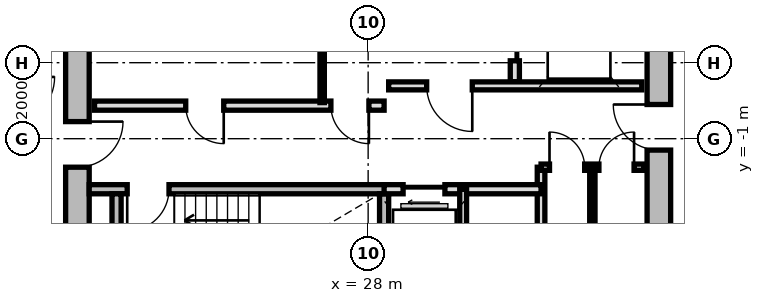
"""IFC4 building model, lengths in metres.
Left out: names, types, materials, properties, quantities, classifications, styles, units other than length and angle.
Written with IfcOpenShell. Run it as: python <this file> out.ifc"""

import sys

from ifc_helpers import new_model, si_unit, direction, frame, frame_2d, origin, place, context, subcontext, project, spatial, rectangle, extrude, source, transform, mapped, element, fill, save


model = new_model("IFC4")
c1 = context("Model", 3, precision=1e-05, world=origin(), true_north=direction((0.0, 1.0)))
c2 = subcontext(c1, "Body", "Model", "MODEL_VIEW")
j1 = project(units=[si_unit("LENGTHUNIT", "METRE"), si_unit("PLANEANGLEUNIT", "RADIAN")], contexts=[c1])
p1 = place(None, origin())
s1 = spatial("IfcSite", under=j1, at=p1, CompositionType="ELEMENT")
p2 = place(p1, origin())
s2 = spatial("IfcBuilding", under=s1, at=p2, CompositionType="ELEMENT")
p3 = place(p2, frame((0.0, 0.0, 146.5)))
s3 = spatial("IfcBuildingStorey", under=s2, at=p3, CompositionType="ELEMENT", Elevation=146.5)
m1 = source(origin(), c2, "Body", "SweptSolid", [
    extrude(rectangle(XDim=11.1, YDim=0.62, at=frame_2d((5.55, 0.0))), origin(), (0.0, 0.0, 1.0), 2.81),
])
p4 = place(p3, frame((20.35, -5.55, 0.0), z_axis=(0.0, 0.0, 1.0), x_axis=(0.0, 1.0, 0.0)))
e1 = element("IfcWall", 1, at=p4, inside=s3, PredefinedType="SHEAR", context=c2, shape_type="MappedRepresentation", body=[
    mapped(m1, transform((0.0, 0.0, 0.0), x_axis=(1.0, 0.0, 0.0), y_axis=(0.0, 1.0, 0.0), z_axis=(0.0, 0.0, 1.0), scale=1.0)),
])
p5 = place(p4, frame((3.8, 0.0, 0.0)))
e2 = element("IfcOpeningElement", 2, at=p5, cuts=e1, PredefinedType="OPENING", context=c2, shape_type="SweptSolid", body=[
    extrude(rectangle(XDim=1.2, YDim=2.15, at=frame_2d((0.6, 1.075))), frame((0.0, 0.32, 0.0), z_axis=(0.0, -1.0, 0.0), x_axis=(1.0, 0.0, 0.0)), (0.0, 0.0, 1.0), 0.64),
])
p6 = place(p3, frame((35.65, 5.55, 0.0), z_axis=(0.0, 0.0, 1.0), x_axis=(0.0, -1.0, 0.0)))
e3 = element("IfcWall", 3, at=p6, inside=s3, PredefinedType="SHEAR", context=c2, shape_type="MappedRepresentation", body=[
    mapped(m1, transform((0.0, 0.0, 0.0), x_axis=(1.0, 0.0, 0.0), y_axis=(0.0, 1.0, 0.0), z_axis=(0.0, 0.0, 1.0), scale=1.0)),
])
p7 = place(p6, frame((5.65, 0.0, 0.0)))
e4 = element("IfcOpeningElement", 4, at=p7, cuts=e3, PredefinedType="OPENING", context=c2, shape_type="SweptSolid", body=[
    extrude(rectangle(XDim=1.2, YDim=2.15, at=frame_2d((0.6, 1.075))), frame((0.0, 0.32, 0.0), z_axis=(0.0, -1.0, 0.0), x_axis=(1.0, 0.0, 0.0)), (0.0, 0.0, 1.0), 0.64),
])
m2 = source(origin(), c2, "Body", "SweptSolid", [
    extrude(rectangle(XDim=7.88, YDim=0.24, at=frame_2d((3.94, 0.0))), origin(), (0.0, 0.0, 1.0), 2.81),
])
p8 = place(p3, frame((20.66, -2.33, 0.0), z_axis=(0.0, 0.0, 1.0), x_axis=(1.0, 0.0, 0.0)))
e5 = element("IfcWall", 5, at=p8, inside=s3, PredefinedType="PARTITIONING", context=c2, shape_type="MappedRepresentation", body=[
    mapped(m2, transform((0.0, 0.0, 0.0), x_axis=(1.0, 0.0, 0.0), y_axis=(0.0, 1.0, 0.0), z_axis=(0.0, 0.0, 1.0), scale=1.0)),
])
p9 = place(p8, frame((1.0, 0.0, 0.0)))
e6 = element("IfcOpeningElement", 6, at=p9, cuts=e5, PredefinedType="OPENING", context=c2, shape_type="SweptSolid", body=[
    extrude(rectangle(XDim=1.1, YDim=2.15, at=frame_2d((0.55, 1.075))), frame((0.0, 0.13, 0.0), z_axis=(0.0, -1.0, 0.0), x_axis=(1.0, 0.0, 0.0)), (0.0, 0.0, 1.0), 0.26),
])
m3 = source(origin(), c2, "Body", "SweptSolid", [
    extrude(rectangle(XDim=3.19, YDim=0.24, at=frame_2d((1.595, 0.0))), origin(), (0.0, 0.0, 1.0), 2.81),
])
for number, where, z_axis, x_axis in (
    (7, (21.38, -5.64, 0.0), (0.0, 0.0, 1.0), (0.0, 1.0, 0.0)),
    (8, (28.42, -5.64, 0.0), (0.0, 0.0, 1.0), (0.0, 1.0, 0.0)),
):
    element("IfcWall", number, at=place(p3, frame(where, z_axis=z_axis, x_axis=x_axis)), inside=s3, PredefinedType="PARTITIONING", context=c2, shape_type="MappedRepresentation", body=[
        mapped(m3, transform((0.0, 0.0, 0.0), x_axis=(1.0, 0.0, 0.0), y_axis=(0.0, 1.0, 0.0), z_axis=(0.0, 0.0, 1.0), scale=1.0)),
    ])
m4 = source(origin(), c2, "Body", "SweptSolid", [
    extrude(rectangle(XDim=5.0, YDim=0.24, at=frame_2d((2.5, 0.0))), origin(), (0.0, 0.0, 1.0), 2.795),
])
p10 = place(p3, frame((31.86, 0.5, 0.0), z_axis=(0.0, 0.0, 1.0), x_axis=(0.0, 1.0, 0.0)))
e9 = element("IfcWall", 9, at=p10, inside=s3, PredefinedType="PARTITIONING", context=c2, shape_type="MappedRepresentation", body=[
    mapped(m4, transform((0.0, 0.0, 0.0), x_axis=(1.0, 0.0, 0.0), y_axis=(0.0, 1.0, 0.0), z_axis=(0.0, 0.0, 1.0), scale=1.0)),
])
p11 = place(p10, frame((3.05, 0.0, 0.0)))
e10 = element("IfcOpeningElement", 10, at=p11, cuts=e9, PredefinedType="OPENING", context=c2, shape_type="SweptSolid", body=[
    extrude(rectangle(XDim=1.3, YDim=2.2, at=frame_2d((0.65, 1.1))), frame((0.0, 0.13, 0.0), z_axis=(0.0, -1.0, 0.0), x_axis=(1.0, 0.0, 0.0)), (0.0, 0.0, 1.0), 0.26),
])
p12 = place(p10, frame((0.55, 0.0, 0.0)))
e11 = element("IfcOpeningElement", 11, at=p12, cuts=e9, PredefinedType="OPENING", context=c2, shape_type="SweptSolid", body=[
    extrude(rectangle(XDim=1.3, YDim=2.2, at=frame_2d((0.65, 1.1))), frame((0.0, 0.13, 0.0), z_axis=(0.0, -1.0, 0.0), x_axis=(1.0, 0.0, 0.0)), (0.0, 0.0, 1.0), 0.26),
])
m5 = source(origin(), c2, "Body", "SweptSolid", [
    extrude(rectangle(XDim=6.66, YDim=0.21, at=frame_2d((3.33, 0.0))), origin(), (0.0, 0.0, 1.0), 2.795),
])
p13 = place(p3, frame((28.54, 0.39, 0.0), z_axis=(0.0, 0.0, 1.0), x_axis=(1.0, 0.0, 0.0)))
e12 = element("IfcWall", 12, at=p13, inside=s3, PredefinedType="PARTITIONING", context=c2, shape_type="MappedRepresentation", body=[
    mapped(m5, transform((0.0, 0.0, 0.0), x_axis=(1.0, 0.0, 0.0), y_axis=(0.0, 1.0, 0.0), z_axis=(0.0, 0.0, 1.0), scale=1.0)),
])
p14 = place(p13, frame((1.0, 0.0, 0.0)))
e13 = element("IfcOpeningElement", 13, at=p14, cuts=e12, PredefinedType="OPENING", context=c2, shape_type="SweptSolid", body=[
    extrude(rectangle(XDim=1.2, YDim=2.15, at=frame_2d((0.6, 1.075))), frame((0.0, 0.115, 0.0), z_axis=(0.0, -1.0, 0.0), x_axis=(1.0, 0.0, 0.0)), (0.0, 0.0, 1.0), 0.23),
])
m6 = source(origin(), c2, "Body", "SweptSolid", [
    extrude(rectangle(XDim=7.62, YDim=0.24, at=frame_2d((3.81, 0.0))), origin(), (0.0, 0.0, 1.0), 2.795),
])
p15 = place(p3, frame((20.8, -0.13, 0.0), z_axis=(0.0, 0.0, 1.0), x_axis=(1.0, 0.0, 0.0)))
e14 = element("IfcWall", 14, at=p15, inside=s3, PredefinedType="PARTITIONING", context=c2, shape_type="MappedRepresentation", body=[
    mapped(m6, transform((0.0, 0.0, 0.0), x_axis=(1.0, 0.0, 0.0), y_axis=(0.0, 1.0, 0.0), z_axis=(0.0, 0.0, 1.0), scale=1.0)),
])
p16 = place(p15, frame((6.22, 0.0, 0.0)))
e15 = element("IfcOpeningElement", 15, at=p16, cuts=e14, PredefinedType="OPENING", context=c2, shape_type="SweptSolid", body=[
    extrude(rectangle(XDim=1.0, YDim=2.1, at=frame_2d((0.5, 1.05))), frame((0.0, 0.13, 0.0), z_axis=(0.0, -1.0, 0.0), x_axis=(1.0, 0.0, 0.0)), (0.0, 0.0, 1.0), 0.26),
])
p17 = place(p15, frame((2.4, 0.0, 0.0)))
e16 = element("IfcOpeningElement", 16, at=p17, cuts=e14, PredefinedType="OPENING", context=c2, shape_type="SweptSolid", body=[
    extrude(rectangle(XDim=1.0, YDim=2.1, at=frame_2d((0.5, 1.05))), frame((0.0, 0.13, 0.0), z_axis=(0.0, -1.0, 0.0), x_axis=(1.0, 0.0, 0.0)), (0.0, 0.0, 1.0), 0.26),
])
m7 = source(origin(), c2, "Body", "SweptSolid", [
    extrude(rectangle(XDim=2.33, YDim=0.115, at=frame_2d((1.165, 0.0))), origin(), (0.0, 0.0, 1.0), 2.795),
])
p18 = place(p3, frame((26.79, -0.05, 0.0), z_axis=(0.0, 0.0, 1.0), x_axis=(0.0, 1.0, 0.0)))
e17 = element("IfcWall", 17, at=p18, inside=s3, PredefinedType="PARTITIONING", context=c2, shape_type="MappedRepresentation", body=[
    mapped(m7, transform((0.0, 0.0, 0.0), x_axis=(1.0, 0.0, 0.0), y_axis=(0.0, 1.0, 0.0), z_axis=(0.0, 0.0, 1.0), scale=1.0)),
])
m8 = source(origin(), c2, "Body", "SweptSolid", [
    extrude(rectangle(XDim=3.8, YDim=0.2, at=frame_2d((1.9, 0.0))), origin(), (0.0, 0.0, 1.0), 2.795),
])
p19 = place(p3, frame((32.55, -5.55, 0.0), z_axis=(0.0, 0.0, 1.0), x_axis=(0.0, 1.0, 0.0)))
e18 = element("IfcWall", 18, at=p19, inside=s3, PredefinedType="PARTITIONING", context=c2, shape_type="MappedRepresentation", body=[
    mapped(m8, transform((0.0, 0.0, 0.0), x_axis=(1.0, 0.0, 0.0), y_axis=(0.0, 1.0, 0.0), z_axis=(0.0, 0.0, 1.0), scale=1.0)),
])
m9 = source(origin(), c2, "Body", "SweptSolid", [
    extrude(rectangle(XDim=4.13, YDim=0.24, at=frame_2d((2.065, 0.0))), origin(), (0.0, 0.0, 1.0), 2.795),
])
p20 = place(p3, frame((28.42, -2.33, 0.0), z_axis=(0.0, 0.0, 1.0), x_axis=(1.0, 0.0, 0.0)))
e19 = element("IfcWall", 19, at=p20, inside=s3, PredefinedType="PARTITIONING", context=c2, shape_type="MappedRepresentation", body=[
    mapped(m9, transform((0.0, 0.0, 0.0), x_axis=(1.0, 0.0, 0.0), y_axis=(0.0, 1.0, 0.0), z_axis=(0.0, 0.0, 1.0), scale=1.0)),
])
p21 = place(p20, frame((0.5, 0.0, 0.0)))
e20 = element("IfcOpeningElement", 20, at=p21, cuts=e19, PredefinedType="OPENING", context=c2, shape_type="SweptSolid", body=[
    extrude(rectangle(XDim=1.1, YDim=2.2, at=frame_2d((0.55, 1.1))), frame((0.0, 0.13, 0.0), z_axis=(0.0, -1.0, 0.0), x_axis=(1.0, 0.0, 0.0)), (0.0, 0.0, 1.0), 0.26),
])
m10 = source(origin(), c2, "Body", "SweptSolid", [
    extrude(rectangle(XDim=3.22, YDim=0.18, at=frame_2d((1.61, 0.0))), origin(), (0.0, 0.0, 1.0), 2.795),
])
p22 = place(p3, frame((30.5, -5.55, 0.0), z_axis=(0.0, 0.0, 1.0), x_axis=(0.0, 1.0, 0.0)))
e21 = element("IfcWall", 21, at=p22, inside=s3, PredefinedType="PARTITIONING", context=c2, shape_type="MappedRepresentation", body=[
    mapped(m10, transform((0.0, 0.0, 0.0), x_axis=(1.0, 0.0, 0.0), y_axis=(0.0, 1.0, 0.0), z_axis=(0.0, 0.0, 1.0), scale=1.0)),
])
m11 = source(origin(), c2, "Body", "SweptSolid", [
    extrude(rectangle(XDim=2.7, YDim=0.165, at=frame_2d((1.35, 0.0))), origin(), (0.0, 0.0, 1.0), 2.795),
])
p23 = place(p3, frame((32.55, -1.75, 0.0), z_axis=(0.0, 0.0, 1.0), x_axis=(1.0, 0.0, 0.0)))
e22 = element("IfcWall", 22, at=p23, inside=s3, PredefinedType="PARTITIONING", context=c2, shape_type="MappedRepresentation", body=[
    mapped(m11, transform((0.0, 0.0, 0.0), x_axis=(1.0, 0.0, 0.0), y_axis=(0.0, 1.0, 0.0), z_axis=(0.0, 0.0, 1.0), scale=1.0)),
])
p24 = place(p23, frame((0.222, 0.0, 0.0)))
e23 = element("IfcOpeningElement", 23, at=p24, cuts=e22, PredefinedType="OPENING", context=c2, shape_type="SweptSolid", body=[
    extrude(rectangle(XDim=0.925, YDim=2.1, at=frame_2d((0.462, 1.05))), frame((0.0, 0.093, 0.0), z_axis=(0.0, -1.0, 0.0), x_axis=(1.0, 0.0, 0.0)), (0.0, 0.0, 1.0), 0.185),
])
p25 = place(p23, frame((1.522, 0.0, 0.0)))
e24 = element("IfcOpeningElement", 24, at=p25, cuts=e22, PredefinedType="OPENING", context=c2, shape_type="SweptSolid", body=[
    extrude(rectangle(XDim=0.925, YDim=2.1, at=frame_2d((0.462, 1.05))), frame((0.0, 0.093, 0.0), z_axis=(0.0, -1.0, 0.0), x_axis=(1.0, 0.0, 0.0)), (0.0, 0.0, 1.0), 0.185),
])
m12 = source(origin(), c2, "Body", "SweptSolid", [
    extrude(rectangle(XDim=3.8, YDim=0.14, at=frame_2d((1.9, 0.0))), origin(), (0.0, 0.0, 1.0), 2.795),
])
p26 = place(p3, frame((33.9, -5.55, 0.0), z_axis=(0.0, 0.0, 1.0), x_axis=(0.0, 1.0, 0.0)))
e25 = element("IfcWall", 25, at=p26, inside=s3, PredefinedType="PARTITIONING", context=c2, shape_type="MappedRepresentation", body=[
    mapped(m12, transform((0.0, 0.0, 0.0), x_axis=(1.0, 0.0, 0.0), y_axis=(0.0, 1.0, 0.0), z_axis=(0.0, 0.0, 1.0), scale=1.0)),
])
m13 = source(origin(), c2, "Body", "SweptSolid", [
    extrude(rectangle(XDim=1.1, YDim=2.15, at=frame_2d((0.55, 1.075))), frame((0.0, 0.025, 0.0), z_axis=(0.0, -1.0, 0.0), x_axis=(1.0, 0.0, 0.0)), (0.0, 0.0, 1.0), 0.05),
])
p27 = place(p9, frame((1.1, 0.0, 0.0), z_axis=(0.0, 0.0, 1.0), x_axis=(-1.0, 0.0, 0.0)))
e26 = element("IfcDoor", 26, at=p27, inside=s3, OperationType="SINGLE_SWING_RIGHT", PredefinedType="DOOR", context=c2, shape_type="MappedRepresentation", body=[
    mapped(m13, transform((0.0, 0.0, 0.0), x_axis=(1.0, 0.0, 0.0), y_axis=(0.0, 1.0, 0.0), z_axis=(0.0, 0.0, 1.0), scale=1.0)),
])
fill(e6, e26)
m14 = source(origin(), c2, "Body", "SweptSolid", [
    extrude(rectangle(XDim=1.3, YDim=2.2, at=frame_2d((0.65, 1.1))), frame((0.0, 0.025, 0.0), z_axis=(0.0, -1.0, 0.0), x_axis=(1.0, 0.0, 0.0)), (0.0, 0.0, 1.0), 0.05),
])
p28 = place(p12, origin())
e27 = element("IfcDoor", 27, at=p28, inside=s3, OperationType="SLIDING_TO_RIGHT", PredefinedType="DOOR", context=c2, shape_type="MappedRepresentation", body=[
    mapped(m14, transform((0.0, 0.0, 0.0), x_axis=(1.0, 0.0, 0.0), y_axis=(0.0, 1.0, 0.0), z_axis=(0.0, 0.0, 1.0), scale=1.0)),
])
fill(e11, e27)
m15 = source(origin(), c2, "Body", "SweptSolid", [
    extrude(rectangle(XDim=1.2, YDim=2.15, at=frame_2d((0.6, 1.075))), frame((0.0, 0.025, 0.0), z_axis=(0.0, -1.0, 0.0), x_axis=(1.0, 0.0, 0.0)), (0.0, 0.0, 1.0), 0.05),
])
p29 = place(p14, frame((1.2, 0.0, 0.0), z_axis=(0.0, 0.0, 1.0), x_axis=(-1.0, 0.0, 0.0)))
e28 = element("IfcDoor", 28, at=p29, inside=s3, OperationType="SINGLE_SWING_LEFT", PredefinedType="DOOR", context=c2, shape_type="MappedRepresentation", body=[
    mapped(m15, transform((0.0, 0.0, 0.0), x_axis=(1.0, 0.0, 0.0), y_axis=(0.0, 1.0, 0.0), z_axis=(0.0, 0.0, 1.0), scale=1.0)),
])
fill(e13, e28)
p30 = place(p5, frame((1.2, 0.0, 0.0), z_axis=(0.0, 0.0, 1.0), x_axis=(-1.0, 0.0, 0.0)))
e29 = element("IfcDoor", 29, at=p30, inside=s3, OperationType="SINGLE_SWING_LEFT", PredefinedType="DOOR", context=c2, shape_type="MappedRepresentation", body=[
    mapped(m15, transform((0.0, 0.0, 0.0), x_axis=(1.0, 0.0, 0.0), y_axis=(0.0, 1.0, 0.0), z_axis=(0.0, 0.0, 1.0), scale=1.0)),
])
fill(e2, e29)
p31 = place(p7, frame((1.2, 0.0, 0.0), z_axis=(0.0, 0.0, 1.0), x_axis=(-1.0, 0.0, 0.0)))
e30 = element("IfcDoor", 30, at=p31, inside=s3, OperationType="SINGLE_SWING_RIGHT", PredefinedType="DOOR", context=c2, shape_type="MappedRepresentation", body=[
    mapped(m15, transform((0.0, 0.0, 0.0), x_axis=(1.0, 0.0, 0.0), y_axis=(0.0, 1.0, 0.0), z_axis=(0.0, 0.0, 1.0), scale=1.0)),
])
fill(e4, e30)
m16 = source(origin(), c2, "Body", "SweptSolid", [
    extrude(rectangle(XDim=1.0, YDim=2.1, at=frame_2d((0.5, 1.05))), frame((0.0, 0.025, 0.0), z_axis=(0.0, -1.0, 0.0), x_axis=(1.0, 0.0, 0.0)), (0.0, 0.0, 1.0), 0.05),
])
p32 = place(p16, frame((1.0, 0.0, 0.0), z_axis=(0.0, 0.0, 1.0), x_axis=(-1.0, 0.0, 0.0)))
e31 = element("IfcDoor", 31, at=p32, inside=s3, OperationType="SINGLE_SWING_LEFT", PredefinedType="DOOR", context=c2, shape_type="MappedRepresentation", body=[
    mapped(m16, transform((0.0, 0.0, 0.0), x_axis=(1.0, 0.0, 0.0), y_axis=(0.0, 1.0, 0.0), z_axis=(0.0, 0.0, 1.0), scale=1.0)),
])
fill(e15, e31)
p33 = place(p17, frame((1.0, 0.0, 0.0), z_axis=(0.0, 0.0, 1.0), x_axis=(-1.0, 0.0, 0.0)))
e32 = element("IfcDoor", 32, at=p33, inside=s3, OperationType="SINGLE_SWING_LEFT", PredefinedType="DOOR", context=c2, shape_type="MappedRepresentation", body=[
    mapped(m16, transform((0.0, 0.0, 0.0), x_axis=(1.0, 0.0, 0.0), y_axis=(0.0, 1.0, 0.0), z_axis=(0.0, 0.0, 1.0), scale=1.0)),
])
fill(e16, e32)
m17 = source(origin(), c2, "Body", "SweptSolid", [
    extrude(rectangle(XDim=1.1, YDim=2.2, at=frame_2d((0.55, 1.1))), frame((0.0, 0.025, 0.0), z_axis=(0.0, -1.0, 0.0), x_axis=(1.0, 0.0, 0.0)), (0.0, 0.0, 1.0), 0.05),
])
p34 = place(p21, frame((1.1, 0.0, 0.0), z_axis=(0.0, 0.0, 1.0), x_axis=(-1.0, 0.0, 0.0)))
e33 = element("IfcDoor", 33, at=p34, inside=s3, OperationType="SLIDING_TO_LEFT", PredefinedType="DOOR", context=c2, shape_type="MappedRepresentation", body=[
    mapped(m17, transform((0.0, 0.0, 0.0), x_axis=(1.0, 0.0, 0.0), y_axis=(0.0, 1.0, 0.0), z_axis=(0.0, 0.0, 1.0), scale=1.0)),
])
fill(e20, e33)
m18 = source(origin(), c2, "Body", "SweptSolid", [
    extrude(rectangle(XDim=0.925, YDim=2.1, at=frame_2d((0.462, 1.05))), frame((0.0, 0.025, 0.0), z_axis=(0.0, -1.0, 0.0), x_axis=(1.0, 0.0, 0.0)), (0.0, 0.0, 1.0), 0.05),
])
p35 = place(p24, origin())
e34 = element("IfcDoor", 34, at=p35, inside=s3, OperationType="SINGLE_SWING_LEFT", PredefinedType="DOOR", context=c2, shape_type="MappedRepresentation", body=[
    mapped(m18, transform((0.0, 0.0, 0.0), x_axis=(1.0, 0.0, 0.0), y_axis=(0.0, 1.0, 0.0), z_axis=(0.0, 0.0, 1.0), scale=1.0)),
])
fill(e23, e34)
p36 = place(p25, origin())
e35 = element("IfcDoor", 35, at=p36, inside=s3, OperationType="SINGLE_SWING_RIGHT", PredefinedType="DOOR", context=c2, shape_type="MappedRepresentation", body=[
    mapped(m18, transform((0.0, 0.0, 0.0), x_axis=(1.0, 0.0, 0.0), y_axis=(0.0, 1.0, 0.0), z_axis=(0.0, 0.0, 1.0), scale=1.0)),
])
fill(e24, e35)
save(model, sys.argv[1])
